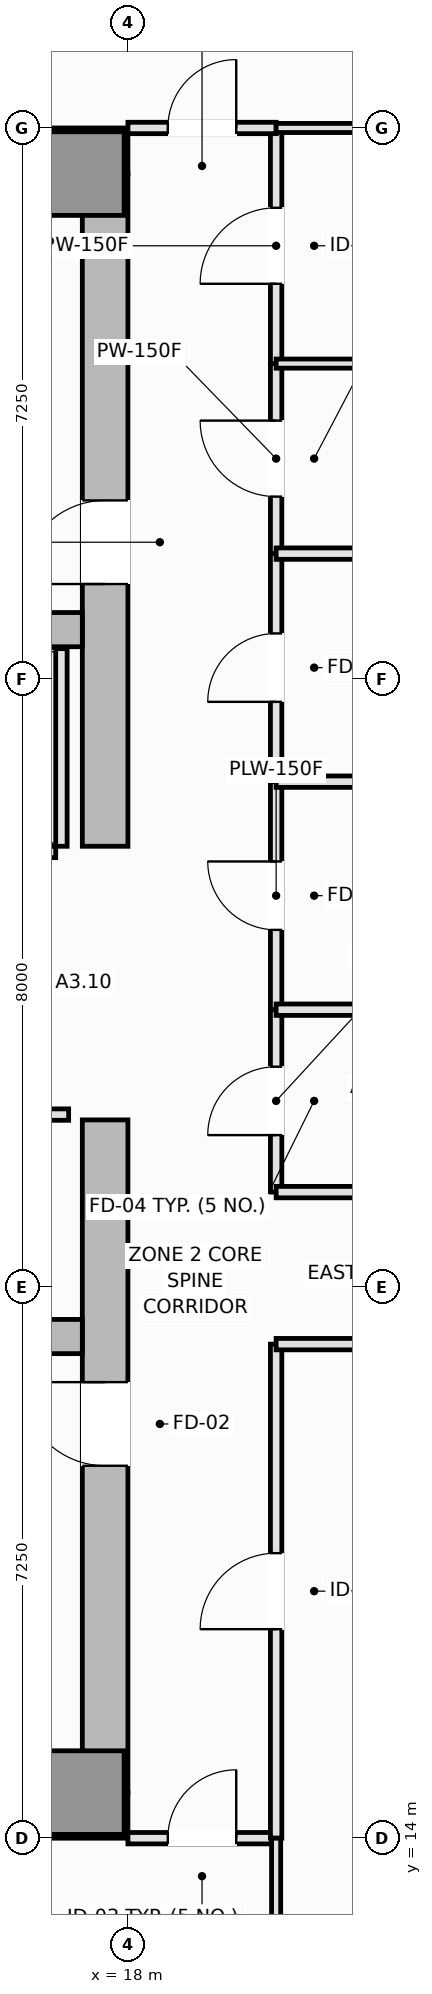
"""IFC4 building model, lengths in metres.
Left out: names, types, materials, properties, quantities, classifications, styles, units other than length and angle.
Written with IfcOpenShell. Run it as: python <this file> out.ifc"""

import sys

from ifc_helpers import new_model, si_unit, direction, frame, frame_2d, origin, origin_2d, place, context, subcontext, project, spatial, rectangle, extrude, element, fill, save


model = new_model("IFC4")
c1 = context("Model", 3, precision=1e-05, world=origin(), true_north=direction((0.0, 1.0)))
c2 = subcontext(c1, "Body", "Model", "MODEL_VIEW")
j1 = project(units=[si_unit("LENGTHUNIT", "METRE"), si_unit("PLANEANGLEUNIT", "RADIAN")], contexts=[c1])
p1 = place(None, origin())
s1 = spatial("IfcSite", under=j1, at=p1, CompositionType="ELEMENT")
p2 = place(p1, origin())
s2 = spatial("IfcBuilding", under=s1, at=p2, CompositionType="ELEMENT")
p3 = place(p2, frame((0.0, 0.0, 105.8)))
s3 = spatial("IfcBuildingStorey", under=s2, at=p3, CompositionType="ELEMENT", Elevation=105.8)
for number, where, z_axis, x_axis in (
    (1, (4.5, 14.3, 0.0), (0.0, 0.0, 1.0), (1.0, 0.0, 0.0)),
    (2, (4.5, 36.2, 0.0), (0.0, 0.0, 1.0), (1.0, 0.0, 0.0)),
):
    element("IfcWall", number, at=place(p3, frame(where, z_axis=z_axis, x_axis=x_axis)), inside=s3, PredefinedType="SHEAR", context=c2, shape_type="SweptSolid", body=[
        extrude(rectangle(XDim=13.5, YDim=0.6, at=frame_2d((6.75, 0.0))), origin(), (0.0, 0.0, 1.0), 3.55),
    ])
p4 = place(p3, frame((17.7, 14.6, 0.0), z_axis=(0.0, 0.0, 1.0), x_axis=(0.0, 1.0, 0.0)))
e3 = element("IfcWall", 3, at=p4, inside=s3, PredefinedType="SHEAR", context=c2, shape_type="SweptSolid", body=[
    extrude(rectangle(XDim=8.85, YDim=0.6, at=frame_2d((4.425, 0.0))), origin(), (0.0, 0.0, 1.0), 3.55),
])
p5 = place(p4, frame((4.3, 0.0, 0.0)))
e4 = element("IfcOpeningElement", 4, at=p5, cuts=e3, PredefinedType="OPENING", context=c2, shape_type="SweptSolid", body=[
    extrude(rectangle(XDim=1.1, YDim=2.15, at=frame_2d((0.55, 1.075))), frame((0.0, 0.31, 0.0), z_axis=(0.0, -1.0, 0.0), x_axis=(1.0, 0.0, 0.0)), (0.0, 0.0, 1.0), 0.62),
])
p6 = place(p3, frame((17.7, 27.05, 0.0), z_axis=(0.0, 0.0, 1.0), x_axis=(0.0, 1.0, 0.0)))
e5 = element("IfcWall", 5, at=p6, inside=s3, PredefinedType="SHEAR", context=c2, shape_type="SweptSolid", body=[
    extrude(rectangle(XDim=8.85, YDim=0.6, at=frame_2d((4.425, 0.0))), origin(), (0.0, 0.0, 1.0), 3.55),
])
p7 = place(p6, frame((3.45, 0.0, 0.0)))
e6 = element("IfcOpeningElement", 6, at=p7, cuts=e5, PredefinedType="OPENING", context=c2, shape_type="SweptSolid", body=[
    extrude(rectangle(XDim=1.1, YDim=2.15, at=frame_2d((0.55, 1.075))), frame((0.0, 0.31, 0.0), z_axis=(0.0, -1.0, 0.0), x_axis=(1.0, 0.0, 0.0)), (0.0, 0.0, 1.0), 0.62),
])
for number, where, z_axis, x_axis in (
    (7, (5.1, 20.6, 0.0), (0.0, 0.0, 1.0), (1.0, 0.0, 0.0)),
    (8, (5.1, 29.9, 0.0), (0.0, 0.0, 1.0), (1.0, 0.0, 0.0)),
):
    element("IfcWall", number, at=place(p3, frame(where, z_axis=z_axis, x_axis=x_axis)), inside=s3, PredefinedType="SHEAR", context=c2, shape_type="SweptSolid", body=[
        extrude(rectangle(XDim=12.3, YDim=0.45, at=frame_2d((6.15, 0.0))), origin(), (0.0, 0.0, 1.0), 3.55),
    ])
for number, where, z_axis, x_axis in (
    (9, (17.4, 14.6, 0.0), (0.0, 0.0, 1.0), (1.0, 0.0, 0.0)),
    (10, (17.4, 35.9, 0.0), (0.0, 0.0, 1.0), (1.0, 0.0, 0.0)),
):
    element("IfcColumn", number, at=place(p3, frame(where, z_axis=z_axis, x_axis=x_axis)), inside=s3, PredefinedType="PILASTER", context=c2, shape_type="SweptSolid", body=[
        extrude(rectangle(XDim=1.1, YDim=1.1, at=origin_2d()), origin(), (0.0, 0.0, 1.0), 3.55),
    ])
p8 = place(p3, frame((14.5, 26.975, 0.0), z_axis=(0.0, 0.0, 1.0), x_axis=(1.0, 0.0, 0.0)))
e11 = element("IfcWall", 11, at=p8, inside=s3, PredefinedType="PARTITIONING", context=c2, shape_type="SweptSolid", body=[
    extrude(rectangle(XDim=2.55, YDim=0.15, at=frame_2d((1.275, 0.0))), origin(), (0.0, 0.0, 1.0), 3.37),
])
p9 = place(p8, frame((0.625, 0.0, 0.0)))
e12 = element("IfcOpeningElement", 12, at=p9, cuts=e11, PredefinedType="OPENING", context=c2, shape_type="SweptSolid", body=[
    extrude(rectangle(XDim=1.3, YDim=2.2, at=frame_2d((0.65, 1.1))), frame((0.0, 0.085, 0.0), z_axis=(0.0, -1.0, 0.0), x_axis=(1.0, 0.0, 0.0)), (0.0, 0.0, 1.0), 0.17),
])
p10 = place(p3, frame((17.125, 27.05, 0.0), z_axis=(0.0, 0.0, 1.0), x_axis=(0.0, 1.0, 0.0)))
e13 = element("IfcWall", 13, at=p10, inside=s3, PredefinedType="PARTITIONING", context=c2, shape_type="SweptSolid", body=[
    extrude(rectangle(XDim=2.6, YDim=0.15, at=frame_2d((1.3, 0.0))), origin(), (0.0, 0.0, 1.0), 3.37),
])
p11 = place(p3, frame((14.33, 23.52, 0.0), z_axis=(0.0, 0.0, 1.0), x_axis=(1.0, 0.0, 0.0)))
e14 = element("IfcWall", 14, at=p11, inside=s3, PredefinedType="PARTITIONING", context=c2, shape_type="SweptSolid", body=[
    extrude(rectangle(XDim=2.89, YDim=0.15, at=frame_2d((1.445, 0.0))), origin(), (0.0, 0.0, 1.0), 3.37),
])
p12 = place(p11, frame((1.053, 0.0, 0.0)))
e15 = element("IfcOpeningElement", 15, at=p12, cuts=e14, PredefinedType="OPENING", context=c2, shape_type="SweptSolid", body=[
    extrude(rectangle(XDim=0.9, YDim=2.1, at=frame_2d((0.45, 1.05))), frame((0.0, 0.085, 0.0), z_axis=(0.0, -1.0, 0.0), x_axis=(1.0, 0.0, 0.0)), (0.0, 0.0, 1.0), 0.17),
])
p13 = place(p3, frame((19.95, 22.5, 0.0), z_axis=(0.0, 0.0, 1.0), x_axis=(0.0, 1.0, 0.0)))
e16 = element("IfcWall", 16, at=p13, inside=s3, PredefinedType="PLUMBINGWALL", context=c2, shape_type="SweptSolid", body=[
    extrude(rectangle(XDim=2.4, YDim=0.15, at=frame_2d((1.2, 0.0))), origin(), (0.0, 0.0, 1.0), 3.37),
])
p14 = place(p13, frame((0.75, 0.0, 0.0)))
e17 = element("IfcOpeningElement", 17, at=p14, cuts=e16, PredefinedType="OPENING", context=c2, shape_type="SweptSolid", body=[
    extrude(rectangle(XDim=0.9, YDim=2.1, at=frame_2d((0.45, 1.05))), frame((0.0, 0.085, 0.0), z_axis=(0.0, -1.0, 0.0), x_axis=(1.0, 0.0, 0.0)), (0.0, 0.0, 1.0), 0.17),
])
p15 = place(p3, frame((19.95, 24.9, 0.0), z_axis=(0.0, 0.0, 1.0), x_axis=(0.0, 1.0, 0.0)))
e18 = element("IfcWall", 18, at=p15, inside=s3, PredefinedType="PLUMBINGWALL", context=c2, shape_type="SweptSolid", body=[
    extrude(rectangle(XDim=3.0, YDim=0.15, at=frame_2d((1.5, 0.0))), origin(), (0.0, 0.0, 1.0), 3.37),
])
p16 = place(p15, frame((1.05, 0.0, 0.0)))
e19 = element("IfcOpeningElement", 19, at=p16, cuts=e18, PredefinedType="OPENING", context=c2, shape_type="SweptSolid", body=[
    extrude(rectangle(XDim=0.9, YDim=2.1, at=frame_2d((0.45, 1.05))), frame((0.0, 0.085, 0.0), z_axis=(0.0, -1.0, 0.0), x_axis=(1.0, 0.0, 0.0)), (0.0, 0.0, 1.0), 0.17),
])
p17 = place(p3, frame((19.95, 27.9, 0.0), z_axis=(0.0, 0.0, 1.0), x_axis=(0.0, 1.0, 0.0)))
e20 = element("IfcWall", 20, at=p17, inside=s3, PredefinedType="PLUMBINGWALL", context=c2, shape_type="SweptSolid", body=[
    extrude(rectangle(XDim=3.0, YDim=0.15, at=frame_2d((1.5, 0.0))), origin(), (0.0, 0.0, 1.0), 3.37),
])
p18 = place(p17, frame((1.05, 0.0, 0.0)))
e21 = element("IfcOpeningElement", 21, at=p18, cuts=e20, PredefinedType="OPENING", context=c2, shape_type="SweptSolid", body=[
    extrude(rectangle(XDim=0.9, YDim=2.1, at=frame_2d((0.45, 1.05))), frame((0.0, 0.085, 0.0), z_axis=(0.0, -1.0, 0.0), x_axis=(1.0, 0.0, 0.0)), (0.0, 0.0, 1.0), 0.17),
])
p19 = place(p3, frame((19.95, 30.9, 0.0), z_axis=(0.0, 0.0, 1.0), x_axis=(0.0, 1.0, 0.0)))
e22 = element("IfcWall", 22, at=p19, inside=s3, PredefinedType="PARTITIONING", context=c2, shape_type="SweptSolid", body=[
    extrude(rectangle(XDim=2.5, YDim=0.15, at=frame_2d((1.25, 0.0))), origin(), (0.0, 0.0, 1.0), 3.37),
])
p20 = place(p19, frame((0.75, 0.0, 0.0)))
e23 = element("IfcOpeningElement", 23, at=p20, cuts=e22, PredefinedType="OPENING", context=c2, shape_type="SweptSolid", body=[
    extrude(rectangle(XDim=1.0, YDim=2.15, at=frame_2d((0.5, 1.075))), frame((0.0, 0.085, 0.0), z_axis=(0.0, -1.0, 0.0), x_axis=(1.0, 0.0, 0.0)), (0.0, 0.0, 1.0), 0.17),
])
p21 = place(p3, frame((19.95, 33.4, 0.0), z_axis=(0.0, 0.0, 1.0), x_axis=(0.0, 1.0, 0.0)))
e24 = element("IfcWall", 24, at=p21, inside=s3, PredefinedType="PARTITIONING", context=c2, shape_type="SweptSolid", body=[
    extrude(rectangle(XDim=3.1, YDim=0.15, at=frame_2d((1.55, 0.0))), origin(), (0.0, 0.0, 1.0), 3.37),
])
p22 = place(p21, frame((1.05, 0.0, 0.0)))
e25 = element("IfcOpeningElement", 25, at=p22, cuts=e24, PredefinedType="OPENING", context=c2, shape_type="SweptSolid", body=[
    extrude(rectangle(XDim=1.0, YDim=2.15, at=frame_2d((0.5, 1.075))), frame((0.0, 0.085, 0.0), z_axis=(0.0, -1.0, 0.0), x_axis=(1.0, 0.0, 0.0)), (0.0, 0.0, 1.0), 0.17),
])
p23 = place(p3, frame((18.0, 14.0, 0.0), z_axis=(0.0, 0.0, 1.0), x_axis=(1.0, 0.0, 0.0)))
e26 = element("IfcWall", 26, at=p23, inside=s3, PredefinedType="PARTITIONING", context=c2, shape_type="SweptSolid", body=[
    extrude(rectangle(XDim=1.95, YDim=0.15, at=frame_2d((0.975, 0.0))), origin(), (0.0, 0.0, 1.0), 3.37),
])
p24 = place(p23, frame((0.525, 0.0, 0.0)))
e27 = element("IfcOpeningElement", 27, at=p24, cuts=e26, PredefinedType="OPENING", context=c2, shape_type="SweptSolid", body=[
    extrude(rectangle(XDim=0.9, YDim=2.1, at=frame_2d((0.45, 1.05))), frame((0.0, 0.085, 0.0), z_axis=(0.0, -1.0, 0.0), x_axis=(1.0, 0.0, 0.0)), (0.0, 0.0, 1.0), 0.17),
])
p25 = place(p3, frame((19.95, 14.0, 0.0), z_axis=(0.0, 0.0, 1.0), x_axis=(0.0, 1.0, 0.0)))
e28 = element("IfcWall", 28, at=p25, inside=s3, PredefinedType="PARTITIONING", context=c2, shape_type="SweptSolid", body=[
    extrude(rectangle(XDim=6.5, YDim=0.15, at=frame_2d((3.25, 0.0))), origin(), (0.0, 0.0, 1.0), 3.37),
])
p26 = place(p25, frame((2.75, 0.0, 0.0)))
e29 = element("IfcOpeningElement", 29, at=p26, cuts=e28, PredefinedType="OPENING", context=c2, shape_type="SweptSolid", body=[
    extrude(rectangle(XDim=1.0, YDim=2.15, at=frame_2d((0.5, 1.075))), frame((0.0, 0.085, 0.0), z_axis=(0.0, -1.0, 0.0), x_axis=(1.0, 0.0, 0.0)), (0.0, 0.0, 1.0), 0.17),
])
p27 = place(p3, frame((18.0, 36.5, 0.0), z_axis=(0.0, 0.0, 1.0), x_axis=(1.0, 0.0, 0.0)))
e30 = element("IfcWall", 30, at=p27, inside=s3, PredefinedType="PARTITIONING", context=c2, shape_type="SweptSolid", body=[
    extrude(rectangle(XDim=1.95, YDim=0.15, at=frame_2d((0.975, 0.0))), origin(), (0.0, 0.0, 1.0), 3.37),
])
p28 = place(p27, frame((0.525, 0.0, 0.0)))
e31 = element("IfcOpeningElement", 31, at=p28, cuts=e30, PredefinedType="OPENING", context=c2, shape_type="SweptSolid", body=[
    extrude(rectangle(XDim=0.9, YDim=2.1, at=frame_2d((0.45, 1.05))), frame((0.0, 0.085, 0.0), z_axis=(0.0, -1.0, 0.0), x_axis=(1.0, 0.0, 0.0)), (0.0, 0.0, 1.0), 0.17),
])
p29 = place(p3, frame((19.95, 22.5, 0.0), z_axis=(0.0, 0.0, 1.0), x_axis=(1.0, 0.0, 0.0)))
e32 = element("IfcWall", 32, at=p29, inside=s3, PredefinedType="PLUMBINGWALL", context=c2, shape_type="SweptSolid", body=[
    extrude(rectangle(XDim=3.05, YDim=0.15, at=frame_2d((1.525, 0.0))), origin(), (0.0, 0.0, 1.0), 3.37),
])
p30 = place(p3, frame((19.95, 20.5, 0.0), z_axis=(0.0, 0.0, 1.0), x_axis=(1.0, 0.0, 0.0)))
e33 = element("IfcWall", 33, at=p30, inside=s3, PredefinedType="PARTITIONING", context=c2, shape_type="SweptSolid", body=[
    extrude(rectangle(XDim=7.55, YDim=0.15, at=frame_2d((3.775, 0.0))), origin(), (0.0, 0.0, 1.0), 3.37),
])
p31 = place(p3, frame((19.95, 24.9, 0.0), z_axis=(0.0, 0.0, 1.0), x_axis=(1.0, 0.0, 0.0)))
e34 = element("IfcWall", 34, at=p31, inside=s3, PredefinedType="PLUMBINGWALL", context=c2, shape_type="SweptSolid", body=[
    extrude(rectangle(XDim=3.05, YDim=0.15, at=frame_2d((1.525, 0.0))), origin(), (0.0, 0.0, 1.0), 3.37),
])
for number, where, z_axis, x_axis in (
    (35, (19.95, 27.9, 0.0), (0.0, 0.0, 1.0), (1.0, 0.0, 0.0)),
    (36, (19.95, 30.9, 0.0), (0.0, 0.0, 1.0), (1.0, 0.0, 0.0)),
):
    element("IfcWall", number, at=place(p3, frame(where, z_axis=z_axis, x_axis=x_axis)), inside=s3, PredefinedType="PLUMBINGWALL", context=c2, shape_type="SweptSolid", body=[
        extrude(rectangle(XDim=5.45, YDim=0.15, at=frame_2d((2.725, 0.0))), origin(), (0.0, 0.0, 1.0), 3.37),
    ])
for number, where, z_axis, x_axis in (
    (37, (19.95, 33.4, 0.0), (0.0, 0.0, 1.0), (1.0, 0.0, 0.0)),
    (38, (19.95, 36.5, 0.0), (0.0, 0.0, 1.0), (1.0, 0.0, 0.0)),
):
    element("IfcWall", number, at=place(p3, frame(where, z_axis=z_axis, x_axis=x_axis)), inside=s3, PredefinedType="PARTITIONING", context=c2, shape_type="SweptSolid", body=[
        extrude(rectangle(XDim=7.55, YDim=0.12, at=frame_2d((3.775, 0.0))), origin(), (0.0, 0.0, 1.0), 3.37),
    ])
p32 = place(p3, frame((19.95, 3.51, 0.0), z_axis=(0.0, 0.0, 1.0), x_axis=(0.0, 1.0, 0.0)))
e39 = element("IfcWall", 39, at=p32, inside=s3, PredefinedType="PARTITIONING", context=c2, shape_type="SweptSolid", body=[
    extrude(rectangle(XDim=10.49, YDim=0.12, at=frame_2d((5.245, 0.0))), origin(), (0.0, 0.0, 1.0), 3.37),
])
p33 = place(p5, origin())
e40 = element("IfcDoor", 40, at=p33, inside=s3, OperationType="SINGLE_SWING_RIGHT", PredefinedType="DOOR", context=c2, shape_type="SweptSolid", body=[
    extrude(rectangle(XDim=1.1, YDim=2.15, at=frame_2d((0.55, 1.075))), frame((0.0, 0.025, 0.0), z_axis=(0.0, -1.0, 0.0), x_axis=(1.0, 0.0, 0.0)), (0.0, 0.0, 1.0), 0.05),
])
fill(e4, e40)
p34 = place(p7, origin())
e41 = element("IfcDoor", 41, at=p34, inside=s3, OperationType="SINGLE_SWING_LEFT", PredefinedType="DOOR", context=c2, shape_type="SweptSolid", body=[
    extrude(rectangle(XDim=1.1, YDim=2.15, at=frame_2d((0.55, 1.075))), frame((0.0, 0.025, 0.0), z_axis=(0.0, -1.0, 0.0), x_axis=(1.0, 0.0, 0.0)), (0.0, 0.0, 1.0), 0.05),
])
fill(e6, e41)
p35 = place(p14, origin())
e42 = element("IfcDoor", 42, at=p35, inside=s3, OperationType="SINGLE_SWING_LEFT", PredefinedType="DOOR", context=c2, shape_type="SweptSolid", body=[
    extrude(rectangle(XDim=0.9, YDim=2.1, at=frame_2d((0.45, 1.05))), frame((0.0, 0.025, 0.0), z_axis=(0.0, -1.0, 0.0), x_axis=(1.0, 0.0, 0.0)), (0.0, 0.0, 1.0), 0.05),
])
fill(e17, e42)
p36 = place(p16, origin())
e43 = element("IfcDoor", 43, at=p36, inside=s3, OperationType="SINGLE_SWING_RIGHT", PredefinedType="DOOR", context=c2, shape_type="SweptSolid", body=[
    extrude(rectangle(XDim=0.9, YDim=2.1, at=frame_2d((0.45, 1.05))), frame((0.0, 0.025, 0.0), z_axis=(0.0, -1.0, 0.0), x_axis=(1.0, 0.0, 0.0)), (0.0, 0.0, 1.0), 0.05),
])
fill(e19, e43)
p37 = place(p18, origin())
e44 = element("IfcDoor", 44, at=p37, inside=s3, OperationType="SINGLE_SWING_LEFT", PredefinedType="DOOR", context=c2, shape_type="SweptSolid", body=[
    extrude(rectangle(XDim=0.9, YDim=2.1, at=frame_2d((0.45, 1.05))), frame((0.0, 0.025, 0.0), z_axis=(0.0, -1.0, 0.0), x_axis=(1.0, 0.0, 0.0)), (0.0, 0.0, 1.0), 0.05),
])
fill(e21, e44)
p38 = place(p20, origin())
e45 = element("IfcDoor", 45, at=p38, inside=s3, OperationType="SINGLE_SWING_RIGHT", PredefinedType="DOOR", context=c2, shape_type="SweptSolid", body=[
    extrude(rectangle(XDim=1.0, YDim=2.15, at=frame_2d((0.5, 1.075))), frame((0.0, 0.025, 0.0), z_axis=(0.0, -1.0, 0.0), x_axis=(1.0, 0.0, 0.0)), (0.0, 0.0, 1.0), 0.05),
])
fill(e23, e45)
p39 = place(p22, origin())
e46 = element("IfcDoor", 46, at=p39, inside=s3, OperationType="SINGLE_SWING_LEFT", PredefinedType="DOOR", context=c2, shape_type="SweptSolid", body=[
    extrude(rectangle(XDim=1.0, YDim=2.15, at=frame_2d((0.5, 1.075))), frame((0.0, 0.025, 0.0), z_axis=(0.0, -1.0, 0.0), x_axis=(1.0, 0.0, 0.0)), (0.0, 0.0, 1.0), 0.05),
])
fill(e25, e46)
p40 = place(p24, origin())
e47 = element("IfcDoor", 47, at=p40, inside=s3, OperationType="SINGLE_SWING_RIGHT", PredefinedType="DOOR", context=c2, shape_type="SweptSolid", body=[
    extrude(rectangle(XDim=0.9, YDim=2.1, at=frame_2d((0.45, 1.05))), frame((0.0, 0.025, 0.0), z_axis=(0.0, -1.0, 0.0), x_axis=(1.0, 0.0, 0.0)), (0.0, 0.0, 1.0), 0.05),
])
fill(e27, e47)
p41 = place(p26, origin())
e48 = element("IfcDoor", 48, at=p41, inside=s3, OperationType="SINGLE_SWING_LEFT", PredefinedType="DOOR", context=c2, shape_type="SweptSolid", body=[
    extrude(rectangle(XDim=1.0, YDim=2.15, at=frame_2d((0.5, 1.075))), frame((0.0, 0.025, 0.0), z_axis=(0.0, -1.0, 0.0), x_axis=(1.0, 0.0, 0.0)), (0.0, 0.0, 1.0), 0.05),
])
fill(e29, e48)
p42 = place(p28, origin())
e49 = element("IfcDoor", 49, at=p42, inside=s3, OperationType="SINGLE_SWING_RIGHT", PredefinedType="DOOR", context=c2, shape_type="SweptSolid", body=[
    extrude(rectangle(XDim=0.9, YDim=2.1, at=frame_2d((0.45, 1.05))), frame((0.0, 0.025, 0.0), z_axis=(0.0, -1.0, 0.0), x_axis=(1.0, 0.0, 0.0)), (0.0, 0.0, 1.0), 0.05),
])
fill(e31, e49)
save(model, sys.argv[1])
